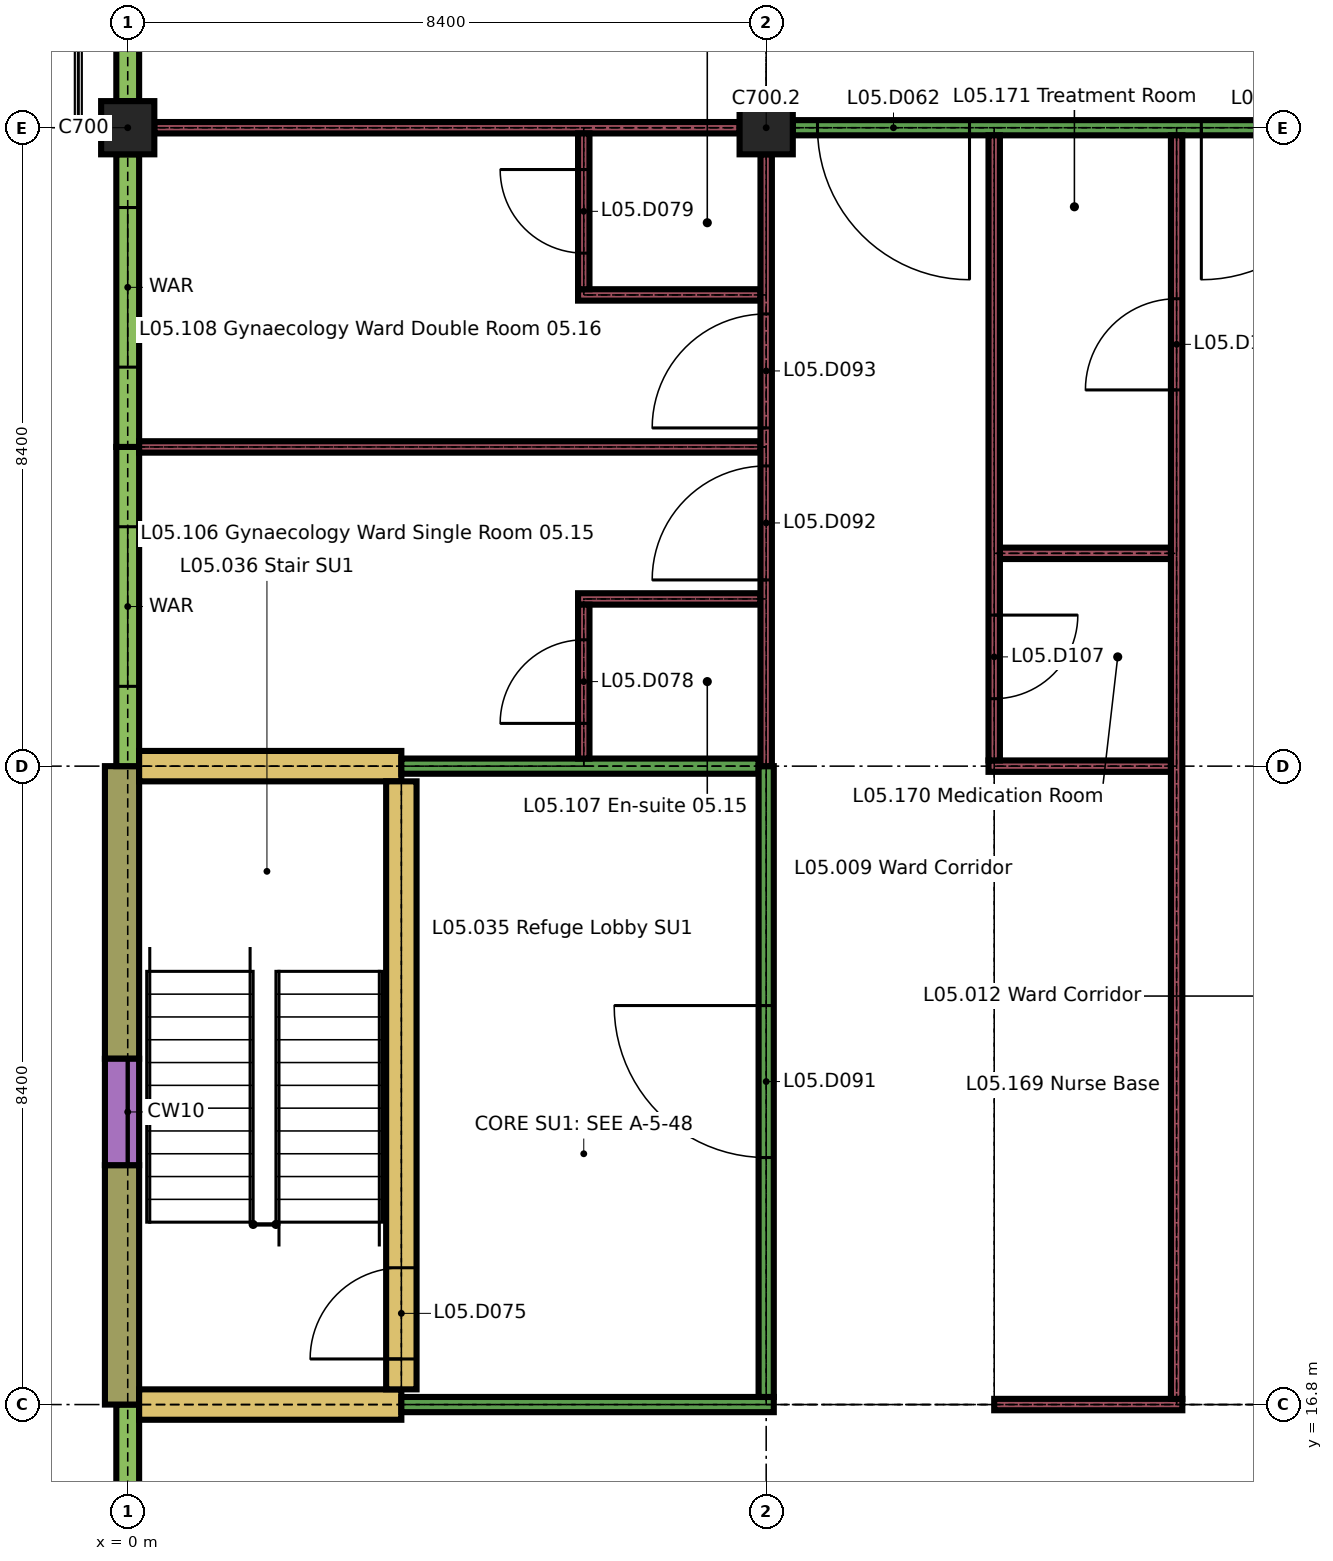
"""IFC4 building model, lengths in metres.
Left out: names, types, materials, properties, quantities, classifications, styles, units other than length and angle.
Written with IfcOpenShell. Run it as: python <this file> out.ifc"""

import sys

from ifc_helpers import new_model, si_unit, direction, frame, frame_2d, origin, origin_2d, place, context, subcontext, project, spatial, rectangle, extrude, element, fill, save


model = new_model("IFC4")
c1 = context("Model", 3, precision=1e-05, world=origin(), true_north=direction((0.0, 1.0)))
c2 = subcontext(c1, "Body", "Model", "MODEL_VIEW")
j1 = project(units=[si_unit("LENGTHUNIT", "METRE"), si_unit("PLANEANGLEUNIT", "RADIAN")], contexts=[c1])
p1 = place(None, origin())
s1 = spatial("IfcSite", under=j1, at=p1, CompositionType="ELEMENT")
p2 = place(p1, origin())
s2 = spatial("IfcBuilding", under=s1, at=p2, CompositionType="ELEMENT")
p3 = place(p2, frame((0.0, 0.0, 22.5)))
s3 = spatial("IfcBuildingStorey", under=s2, at=p3, CompositionType="ELEMENT", Elevation=22.5)
for number, where, z_axis, x_axis in (
    (1, (0.0, 33.6, 0.0), (0.0, 0.0, 1.0), (1.0, 0.0, 0.0)),
    (2, (8.4, 33.6, 0.0), (0.0, 0.0, 1.0), (1.0, 0.0, 0.0)),
):
    element("IfcColumn", number, at=place(p3, frame(where, z_axis=z_axis, x_axis=x_axis)), inside=s3, PredefinedType="COLUMN", context=c2, shape_type="SweptSolid", body=[
        extrude(rectangle(XDim=0.7, YDim=0.7, at=origin_2d()), origin(), (0.0, 0.0, 1.0), 3.26),
    ])
p4 = place(p3, frame((0.0, 13.8, 0.0), z_axis=(0.0, 0.0, 1.0), x_axis=(0.0, 1.0, 0.0)))
e3 = element("IfcWall", 3, at=p4, inside=s3, PredefinedType="SOLIDWALL", context=c2, shape_type="SweptSolid", body=[
    extrude(rectangle(XDim=3.0, YDim=0.3, at=frame_2d((1.5, 0.0))), origin(), (0.0, 0.0, 1.0), 2.96),
])
p5 = place(p4, frame((0.45, 0.0, 0.9)))
e4 = element("IfcOpeningElement", 4, at=p5, cuts=e3, PredefinedType="OPENING", context=c2, shape_type="SweptSolid", body=[
    extrude(rectangle(XDim=0.9, YDim=1.5, at=frame_2d((0.45, 0.75))), frame((0.0, 0.16, 0.0), z_axis=(0.0, -1.0, 0.0), x_axis=(1.0, 0.0, 0.0)), (0.0, 0.0, 1.0), 0.32),
])
p6 = place(p3, frame((-0.075, 16.8, 0.0), z_axis=(0.0, 0.0, 1.0), x_axis=(0.0, 1.0, 0.0)))
e5 = element("IfcWall", 5, at=p6, inside=s3, PredefinedType="SOLIDWALL", context=c2, shape_type="SweptSolid", body=[
    extrude(rectangle(XDim=3.15, YDim=0.45, at=frame_2d((1.575, 0.0))), origin(), (0.0, 0.0, 1.0), 3.26),
])
p7 = place(p3, frame((-0.075, 21.35, 0.0), z_axis=(0.0, 0.0, 1.0), x_axis=(0.0, 1.0, 0.0)))
e6 = element("IfcWall", 6, at=p7, inside=s3, PredefinedType="SOLIDWALL", context=c2, shape_type="SweptSolid", body=[
    extrude(rectangle(XDim=3.85, YDim=0.45, at=frame_2d((1.925, 0.0))), origin(), (0.0, 0.0, 1.0), 3.26),
])
p8 = place(p3, frame((-0.075, 19.95, 0.0), z_axis=(0.0, 0.0, 1.0), x_axis=(0.0, 1.0, 0.0)))
e7 = element("IfcWall", 7, at=p8, inside=s3, PredefinedType="SOLIDWALL", context=c2, shape_type="SweptSolid", body=[
    extrude(rectangle(XDim=1.4, YDim=0.45, at=frame_2d((0.7, 0.0))), origin(), (0.0, 0.0, 1.0), 0.6),
])
p9 = place(p3, frame((0.0, 25.2, 0.0), z_axis=(0.0, 0.0, 1.0), x_axis=(0.0, 1.0, 0.0)))
e8 = element("IfcWall", 8, at=p9, inside=s3, PredefinedType="SOLIDWALL", context=c2, shape_type="SweptSolid", body=[
    extrude(rectangle(XDim=4.2, YDim=0.3, at=frame_2d((2.1, 0.0))), origin(), (0.0, 0.0, 1.0), 2.96),
])
p10 = place(p9, frame((1.05, 0.0, 0.9)))
e9 = element("IfcOpeningElement", 9, at=p10, cuts=e8, PredefinedType="OPENING", context=c2, shape_type="SweptSolid", body=[
    extrude(rectangle(XDim=2.1, YDim=1.5, at=frame_2d((1.05, 0.75))), frame((0.0, 0.16, 0.0), z_axis=(0.0, -1.0, 0.0), x_axis=(1.0, 0.0, 0.0)), (0.0, 0.0, 1.0), 0.32),
])
p11 = place(p3, frame((0.0, 29.4, 0.0), z_axis=(0.0, 0.0, 1.0), x_axis=(0.0, 1.0, 0.0)))
e10 = element("IfcWall", 10, at=p11, inside=s3, PredefinedType="SOLIDWALL", context=c2, shape_type="SweptSolid", body=[
    extrude(rectangle(XDim=3.85, YDim=0.3, at=frame_2d((1.925, 0.0))), origin(), (0.0, 0.0, 1.0), 2.96),
])
p12 = place(p11, frame((1.05, 0.0, 0.9)))
e11 = element("IfcOpeningElement", 11, at=p12, cuts=e10, PredefinedType="OPENING", context=c2, shape_type="SweptSolid", body=[
    extrude(rectangle(XDim=2.1, YDim=1.5, at=frame_2d((1.05, 0.75))), frame((0.0, 0.16, 0.0), z_axis=(0.0, -1.0, 0.0), x_axis=(1.0, 0.0, 0.0)), (0.0, 0.0, 1.0), 0.32),
])
p13 = place(p3, frame((0.0, 33.95, 0.0), z_axis=(0.0, 0.0, 1.0), x_axis=(0.0, 1.0, 0.0)))
e12 = element("IfcWall", 12, at=p13, inside=s3, PredefinedType="SOLIDWALL", context=c2, shape_type="SweptSolid", body=[
    extrude(rectangle(XDim=1.05, YDim=0.3, at=frame_2d((0.525, 0.0))), origin(), (0.0, 0.0, 1.0), 2.96),
])
p14 = place(p3, frame((0.15, 16.8, 0.0), z_axis=(0.0, 0.0, 1.0), x_axis=(1.0, 0.0, 0.0)))
e13 = element("IfcWall", 13, at=p14, inside=s3, PredefinedType="SHEAR", context=c2, shape_type="SweptSolid", body=[
    extrude(rectangle(XDim=3.45, YDim=0.4, at=frame_2d((1.725, 0.0))), origin(), (0.0, 0.0, 1.0), 3.26),
])
p15 = place(p3, frame((3.6, 16.8, 0.0), z_axis=(0.0, 0.0, 1.0), x_axis=(1.0, 0.0, 0.0)))
e14 = element("IfcWall", 14, at=p15, inside=s3, PredefinedType="PARTITIONING", context=c2, shape_type="SweptSolid", body=[
    extrude(rectangle(XDim=4.9, YDim=0.2, at=frame_2d((2.45, 0.0))), origin(), (0.0, 0.0, 1.0), 3.26),
])
p16 = place(p3, frame((11.4, 16.8, 0.0), z_axis=(0.0, 0.0, 1.0), x_axis=(1.0, 0.0, 0.0)))
e15 = element("IfcWall", 15, at=p16, inside=s3, PredefinedType="PARTITIONING", context=c2, shape_type="SweptSolid", body=[
    extrude(rectangle(XDim=2.475, YDim=0.15, at=frame_2d((1.238, 0.0))), origin(), (0.0, 0.0, 1.0), 3.26),
])
p17 = place(p3, frame((0.15, 25.2, 0.0), z_axis=(0.0, 0.0, 1.0), x_axis=(1.0, 0.0, 0.0)))
e16 = element("IfcWall", 16, at=p17, inside=s3, PredefinedType="SHEAR", context=c2, shape_type="SweptSolid", body=[
    extrude(rectangle(XDim=3.45, YDim=0.4, at=frame_2d((1.725, 0.0))), origin(), (0.0, 0.0, 1.0), 3.26),
])
p18 = place(p3, frame((3.6, 25.2, 0.0), z_axis=(0.0, 0.0, 1.0), x_axis=(1.0, 0.0, 0.0)))
e17 = element("IfcWall", 17, at=p18, inside=s3, PredefinedType="PARTITIONING", context=c2, shape_type="SweptSolid", body=[
    extrude(rectangle(XDim=4.7, YDim=0.2, at=frame_2d((2.35, 0.0))), origin(), (0.0, 0.0, 1.0), 3.26),
])
p19 = place(p3, frame((11.325, 25.2, 0.0), z_axis=(0.0, 0.0, 1.0), x_axis=(1.0, 0.0, 0.0)))
e18 = element("IfcWall", 18, at=p19, inside=s3, PredefinedType="PARTITIONING", context=c2, shape_type="SweptSolid", body=[
    extrude(rectangle(XDim=2.4, YDim=0.15, at=frame_2d((1.2, 0.0))), origin(), (0.0, 0.0, 1.0), 3.26),
])
p20 = place(p3, frame((5.925, 27.4, 0.0), z_axis=(0.0, 0.0, 1.0), x_axis=(1.0, 0.0, 0.0)))
e19 = element("IfcWall", 19, at=p20, inside=s3, PredefinedType="PARTITIONING", context=c2, shape_type="SweptSolid", body=[
    extrude(rectangle(XDim=2.4, YDim=0.15, at=frame_2d((1.2, 0.0))), origin(), (0.0, 0.0, 1.0), 3.26),
])
p21 = place(p3, frame((11.475, 28.0, 0.0), z_axis=(0.0, 0.0, 1.0), x_axis=(1.0, 0.0, 0.0)))
e20 = element("IfcWall", 20, at=p21, inside=s3, PredefinedType="PARTITIONING", context=c2, shape_type="SweptSolid", body=[
    extrude(rectangle(XDim=2.25, YDim=0.15, at=frame_2d((1.125, 0.0))), origin(), (0.0, 0.0, 1.0), 3.26),
])
p22 = place(p3, frame((0.15, 29.4, 0.0), z_axis=(0.0, 0.0, 1.0), x_axis=(1.0, 0.0, 0.0)))
e21 = element("IfcWall", 21, at=p22, inside=s3, PredefinedType="PARTITIONING", context=c2, shape_type="SweptSolid", body=[
    extrude(rectangle(XDim=8.175, YDim=0.15, at=frame_2d((4.087, 0.0))), origin(), (0.0, 0.0, 1.0), 3.26),
])
p23 = place(p3, frame((5.925, 31.4, 0.0), z_axis=(0.0, 0.0, 1.0), x_axis=(1.0, 0.0, 0.0)))
e22 = element("IfcWall", 22, at=p23, inside=s3, PredefinedType="PARTITIONING", context=c2, shape_type="SweptSolid", body=[
    extrude(rectangle(XDim=2.4, YDim=0.15, at=frame_2d((1.2, 0.0))), origin(), (0.0, 0.0, 1.0), 3.26),
])
p24 = place(p3, frame((0.35, 33.6, 0.0), z_axis=(0.0, 0.0, 1.0), x_axis=(1.0, 0.0, 0.0)))
e23 = element("IfcWall", 23, at=p24, inside=s3, PredefinedType="PARTITIONING", context=c2, shape_type="SweptSolid", body=[
    extrude(rectangle(XDim=7.7, YDim=0.15, at=frame_2d((3.85, 0.0))), origin(), (0.0, 0.0, 1.0), 3.26),
])
p25 = place(p3, frame((8.75, 33.6, 0.0), z_axis=(0.0, 0.0, 1.0), x_axis=(1.0, 0.0, 0.0)))
e24 = element("IfcWall", 24, at=p25, inside=s3, PredefinedType="PARTITIONING", context=c2, shape_type="SweptSolid", body=[
    extrude(rectangle(XDim=7.7, YDim=0.2, at=frame_2d((3.85, 0.0))), origin(), (0.0, 0.0, 1.0), 3.26),
])
p26 = place(p25, frame((0.325, 0.0, 0.0)))
e25 = element("IfcOpeningElement", 25, at=p26, cuts=e24, PredefinedType="OPENING", context=c2, shape_type="SweptSolid", body=[
    extrude(rectangle(XDim=2.0, YDim=2.4, at=frame_2d((1.0, 1.2))), frame((0.0, 0.11, 0.0), z_axis=(0.0, -1.0, 0.0), x_axis=(1.0, 0.0, 0.0)), (0.0, 0.0, 1.0), 0.22),
])
p27 = place(p25, frame((5.375, 0.0, 0.0)))
e26 = element("IfcOpeningElement", 26, at=p27, cuts=e24, PredefinedType="OPENING", context=c2, shape_type="SweptSolid", body=[
    extrude(rectangle(XDim=2.0, YDim=2.4, at=frame_2d((1.0, 1.2))), frame((0.0, 0.11, 0.0), z_axis=(0.0, -1.0, 0.0), x_axis=(1.0, 0.0, 0.0)), (0.0, 0.0, 1.0), 0.22),
])
p28 = place(p3, frame((3.6, 17.0, 0.0), z_axis=(0.0, 0.0, 1.0), x_axis=(0.0, 1.0, 0.0)))
e27 = element("IfcWall", 27, at=p28, inside=s3, PredefinedType="SHEAR", context=c2, shape_type="SweptSolid", body=[
    extrude(rectangle(XDim=8.0, YDim=0.4, at=frame_2d((4.0, 0.0))), origin(), (0.0, 0.0, 1.0), 3.26),
])
p29 = place(p28, frame((0.4, 0.0, 0.0)))
e28 = element("IfcOpeningElement", 28, at=p29, cuts=e27, PredefinedType="OPENING", context=c2, shape_type="SweptSolid", body=[
    extrude(rectangle(XDim=1.2, YDim=2.1, at=frame_2d((0.6, 1.05))), frame((0.0, 0.21, 0.0), z_axis=(0.0, -1.0, 0.0), x_axis=(1.0, 0.0, 0.0)), (0.0, 0.0, 1.0), 0.42),
])
p30 = place(p3, frame((6.0, 25.3, 0.0), z_axis=(0.0, 0.0, 1.0), x_axis=(0.0, 1.0, 0.0)))
e29 = element("IfcWall", 29, at=p30, inside=s3, PredefinedType="PARTITIONING", context=c2, shape_type="SweptSolid", body=[
    extrude(rectangle(XDim=2.025, YDim=0.15, at=frame_2d((1.012, 0.0))), origin(), (0.0, 0.0, 1.0), 3.26),
])
p31 = place(p30, frame((0.462, 0.0, 0.0)))
e30 = element("IfcOpeningElement", 30, at=p31, cuts=e29, PredefinedType="OPENING", context=c2, shape_type="SweptSolid", body=[
    extrude(rectangle(XDim=1.1, YDim=2.1, at=frame_2d((0.55, 1.05))), frame((0.0, 0.085, 0.0), z_axis=(0.0, -1.0, 0.0), x_axis=(1.0, 0.0, 0.0)), (0.0, 0.0, 1.0), 0.17),
])
p32 = place(p3, frame((6.0, 31.475, 0.0), z_axis=(0.0, 0.0, 1.0), x_axis=(0.0, 1.0, 0.0)))
e31 = element("IfcWall", 31, at=p32, inside=s3, PredefinedType="PARTITIONING", context=c2, shape_type="SweptSolid", body=[
    extrude(rectangle(XDim=2.05, YDim=0.15, at=frame_2d((1.025, 0.0))), origin(), (0.0, 0.0, 1.0), 3.26),
])
p33 = place(p32, frame((0.475, 0.0, 0.0)))
e32 = element("IfcOpeningElement", 32, at=p33, cuts=e31, PredefinedType="OPENING", context=c2, shape_type="SweptSolid", body=[
    extrude(rectangle(XDim=1.1, YDim=2.1, at=frame_2d((0.55, 1.05))), frame((0.0, 0.085, 0.0), z_axis=(0.0, -1.0, 0.0), x_axis=(1.0, 0.0, 0.0)), (0.0, 0.0, 1.0), 0.17),
])
p34 = place(p3, frame((8.4, 16.9, 0.0), z_axis=(0.0, 0.0, 1.0), x_axis=(0.0, 1.0, 0.0)))
e33 = element("IfcWall", 33, at=p34, inside=s3, PredefinedType="PARTITIONING", context=c2, shape_type="SweptSolid", body=[
    extrude(rectangle(XDim=8.3, YDim=0.2, at=frame_2d((4.15, 0.0))), origin(), (0.0, 0.0, 1.0), 3.26),
])
p35 = place(p34, frame((3.15, 0.0, 0.0)))
e34 = element("IfcOpeningElement", 34, at=p35, cuts=e33, PredefinedType="OPENING", context=c2, shape_type="SweptSolid", body=[
    extrude(rectangle(XDim=2.0, YDim=2.4, at=frame_2d((1.0, 1.2))), frame((0.0, 0.11, 0.0), z_axis=(0.0, -1.0, 0.0), x_axis=(1.0, 0.0, 0.0)), (0.0, 0.0, 1.0), 0.22),
])
p36 = place(p3, frame((8.4, 25.2, 0.0), z_axis=(0.0, 0.0, 1.0), x_axis=(0.0, 1.0, 0.0)))
e35 = element("IfcWall", 35, at=p36, inside=s3, PredefinedType="PARTITIONING", context=c2, shape_type="SweptSolid", body=[
    extrude(rectangle(XDim=8.05, YDim=0.15, at=frame_2d((4.025, 0.0))), origin(), (0.0, 0.0, 1.0), 3.26),
])
p37 = place(p36, frame((2.45, 0.0, 0.0)))
e36 = element("IfcOpeningElement", 36, at=p37, cuts=e35, PredefinedType="OPENING", context=c2, shape_type="SweptSolid", body=[
    extrude(rectangle(XDim=1.5, YDim=2.4, at=frame_2d((0.75, 1.2))), frame((0.0, 0.085, 0.0), z_axis=(0.0, -1.0, 0.0), x_axis=(1.0, 0.0, 0.0)), (0.0, 0.0, 1.0), 0.17),
])
p38 = place(p36, frame((4.45, 0.0, 0.0)))
e37 = element("IfcOpeningElement", 37, at=p38, cuts=e35, PredefinedType="OPENING", context=c2, shape_type="SweptSolid", body=[
    extrude(rectangle(XDim=1.5, YDim=2.4, at=frame_2d((0.75, 1.2))), frame((0.0, 0.085, 0.0), z_axis=(0.0, -1.0, 0.0), x_axis=(1.0, 0.0, 0.0)), (0.0, 0.0, 1.0), 0.17),
])
p39 = place(p3, frame((11.4, 25.275, 0.0), z_axis=(0.0, 0.0, 1.0), x_axis=(0.0, 1.0, 0.0)))
e38 = element("IfcWall", 38, at=p39, inside=s3, PredefinedType="PARTITIONING", context=c2, shape_type="SweptSolid", body=[
    extrude(rectangle(XDim=8.225, YDim=0.15, at=frame_2d((4.113, 0.0))), origin(), (0.0, 0.0, 1.0), 3.26),
])
p40 = place(p39, frame((0.812, 0.0, 0.0)))
e39 = element("IfcOpeningElement", 39, at=p40, cuts=e38, PredefinedType="OPENING", context=c2, shape_type="SweptSolid", body=[
    extrude(rectangle(XDim=1.1, YDim=2.1, at=frame_2d((0.55, 1.05))), frame((0.0, 0.085, 0.0), z_axis=(0.0, -1.0, 0.0), x_axis=(1.0, 0.0, 0.0)), (0.0, 0.0, 1.0), 0.17),
])
p41 = place(p3, frame((13.8, 16.875, 0.0), z_axis=(0.0, 0.0, 1.0), x_axis=(0.0, 1.0, 0.0)))
e40 = element("IfcWall", 40, at=p41, inside=s3, PredefinedType="PARTITIONING", context=c2, shape_type="SweptSolid", body=[
    extrude(rectangle(XDim=16.625, YDim=0.15, at=frame_2d((8.312, 0.0))), origin(), (0.0, 0.0, 1.0), 3.26),
])
p42 = place(p41, frame((13.275, 0.0, 0.0)))
e41 = element("IfcOpeningElement", 41, at=p42, cuts=e40, PredefinedType="OPENING", context=c2, shape_type="SweptSolid", body=[
    extrude(rectangle(XDim=1.2, YDim=2.1, at=frame_2d((0.6, 1.05))), frame((0.0, 0.085, 0.0), z_axis=(0.0, -1.0, 0.0), x_axis=(1.0, 0.0, 0.0)), (0.0, 0.0, 1.0), 0.17),
])
p43 = place(p10, origin())
e42 = element("IfcWindow", 42, at=p43, inside=s3, PartitioningType="DOUBLE_PANEL_VERTICAL", PredefinedType="WINDOW", context=c2, shape_type="SweptSolid", body=[
    extrude(rectangle(XDim=2.1, YDim=1.5, at=frame_2d((1.05, 0.75))), frame((0.0, 0.05, 0.0), z_axis=(0.0, -1.0, 0.0), x_axis=(1.0, 0.0, 0.0)), (0.0, 0.0, 1.0), 0.1),
])
fill(e9, e42)
p44 = place(p12, origin())
e43 = element("IfcWindow", 43, at=p44, inside=s3, PartitioningType="DOUBLE_PANEL_VERTICAL", PredefinedType="WINDOW", context=c2, shape_type="SweptSolid", body=[
    extrude(rectangle(XDim=2.1, YDim=1.5, at=frame_2d((1.05, 0.75))), frame((0.0, 0.05, 0.0), z_axis=(0.0, -1.0, 0.0), x_axis=(1.0, 0.0, 0.0)), (0.0, 0.0, 1.0), 0.1),
])
fill(e11, e43)
p45 = place(p26, origin())
e44 = element("IfcDoor", 44, at=p45, inside=s3, OperationType="SINGLE_SWING_RIGHT", PredefinedType="DOOR", context=c2, shape_type="SweptSolid", body=[
    extrude(rectangle(XDim=2.0, YDim=2.4, at=frame_2d((1.0, 1.2))), frame((0.0, 0.03, 0.0), z_axis=(0.0, -1.0, 0.0), x_axis=(1.0, 0.0, 0.0)), (0.0, 0.0, 1.0), 0.06),
])
fill(e25, e44)
p46 = place(p27, origin())
e45 = element("IfcDoor", 45, at=p46, inside=s3, OperationType="SINGLE_SWING_LEFT", PredefinedType="DOOR", context=c2, shape_type="SweptSolid", body=[
    extrude(rectangle(XDim=2.0, YDim=2.4, at=frame_2d((1.0, 1.2))), frame((0.0, 0.03, 0.0), z_axis=(0.0, -1.0, 0.0), x_axis=(1.0, 0.0, 0.0)), (0.0, 0.0, 1.0), 0.06),
])
fill(e26, e45)
p47 = place(p29, origin())
e46 = element("IfcDoor", 46, at=p47, inside=s3, OperationType="SINGLE_SWING_RIGHT", PredefinedType="DOOR", context=c2, shape_type="SweptSolid", body=[
    extrude(rectangle(XDim=1.2, YDim=2.1, at=frame_2d((0.6, 1.05))), frame((0.0, 0.025, 0.0), z_axis=(0.0, -1.0, 0.0), x_axis=(1.0, 0.0, 0.0)), (0.0, 0.0, 1.0), 0.05),
])
fill(e28, e46)
p48 = place(p31, origin())
e47 = element("IfcDoor", 47, at=p48, inside=s3, OperationType="SINGLE_SWING_RIGHT", PredefinedType="DOOR", context=c2, shape_type="SweptSolid", body=[
    extrude(rectangle(XDim=1.1, YDim=2.1, at=frame_2d((0.55, 1.05))), frame((0.0, 0.025, 0.0), z_axis=(0.0, -1.0, 0.0), x_axis=(1.0, 0.0, 0.0)), (0.0, 0.0, 1.0), 0.05),
])
fill(e30, e47)
p49 = place(p33, origin())
e48 = element("IfcDoor", 48, at=p49, inside=s3, OperationType="SINGLE_SWING_LEFT", PredefinedType="DOOR", context=c2, shape_type="SweptSolid", body=[
    extrude(rectangle(XDim=1.1, YDim=2.1, at=frame_2d((0.55, 1.05))), frame((0.0, 0.025, 0.0), z_axis=(0.0, -1.0, 0.0), x_axis=(1.0, 0.0, 0.0)), (0.0, 0.0, 1.0), 0.05),
])
fill(e32, e48)
p50 = place(p35, origin())
e49 = element("IfcDoor", 49, at=p50, inside=s3, OperationType="SINGLE_SWING_LEFT", PredefinedType="DOOR", context=c2, shape_type="SweptSolid", body=[
    extrude(rectangle(XDim=2.0, YDim=2.4, at=frame_2d((1.0, 1.2))), frame((0.0, 0.03, 0.0), z_axis=(0.0, -1.0, 0.0), x_axis=(1.0, 0.0, 0.0)), (0.0, 0.0, 1.0), 0.06),
])
fill(e34, e49)
p51 = place(p37, origin())
e50 = element("IfcDoor", 50, at=p51, inside=s3, OperationType="SINGLE_SWING_RIGHT", PredefinedType="DOOR", context=c2, shape_type="SweptSolid", body=[
    extrude(rectangle(XDim=1.5, YDim=2.4, at=frame_2d((0.75, 1.2))), frame((0.0, 0.03, 0.0), z_axis=(0.0, -1.0, 0.0), x_axis=(1.0, 0.0, 0.0)), (0.0, 0.0, 1.0), 0.06),
])
fill(e36, e50)
p52 = place(p38, origin())
e51 = element("IfcDoor", 51, at=p52, inside=s3, OperationType="SINGLE_SWING_RIGHT", PredefinedType="DOOR", context=c2, shape_type="SweptSolid", body=[
    extrude(rectangle(XDim=1.5, YDim=2.4, at=frame_2d((0.75, 1.2))), frame((0.0, 0.03, 0.0), z_axis=(0.0, -1.0, 0.0), x_axis=(1.0, 0.0, 0.0)), (0.0, 0.0, 1.0), 0.06),
])
fill(e37, e51)
p53 = place(p40, origin())
e52 = element("IfcDoor", 52, at=p53, inside=s3, OperationType="SINGLE_SWING_RIGHT", PredefinedType="DOOR", context=c2, shape_type="SweptSolid", body=[
    extrude(rectangle(XDim=1.1, YDim=2.1, at=frame_2d((0.55, 1.05))), frame((0.0, 0.025, 0.0), z_axis=(0.0, -1.0, 0.0), x_axis=(1.0, 0.0, 0.0)), (0.0, 0.0, 1.0), 0.05),
])
fill(e39, e52)
p54 = place(p42, origin())
e53 = element("IfcDoor", 53, at=p54, inside=s3, OperationType="SINGLE_SWING_RIGHT", PredefinedType="DOOR", context=c2, shape_type="SweptSolid", body=[
    extrude(rectangle(XDim=1.2, YDim=2.1, at=frame_2d((0.6, 1.05))), frame((0.0, 0.025, 0.0), z_axis=(0.0, -1.0, 0.0), x_axis=(1.0, 0.0, 0.0)), (0.0, 0.0, 1.0), 0.05),
])
fill(e41, e53)
save(model, sys.argv[1])
